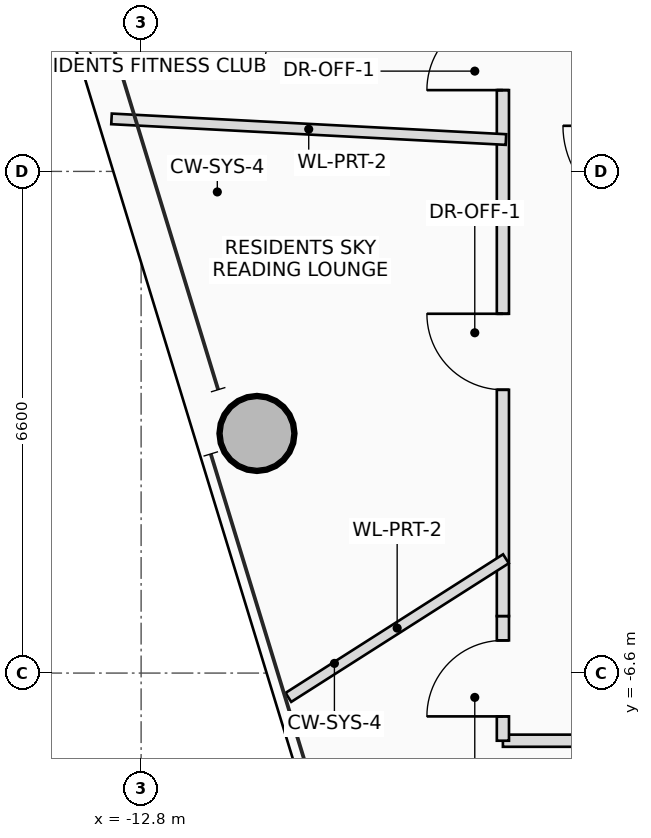
"""IFC4 building model, lengths in metres.
Left out: names, types, materials, properties, quantities, classifications, styles, units other than length and angle.
Written with IfcOpenShell. Run it as: python <this file> out.ifc"""

import sys

from ifc_helpers import new_model, si_unit, direction, frame, frame_2d, origin, origin_2d, place, context, subcontext, project, spatial, rectangle, hollow_circle, extrude, source, transform, mapped, element, fill, save


model = new_model("IFC4")
c1 = context("Model", 3, precision=1e-05, world=origin(), true_north=direction((0.0, 1.0)))
c2 = subcontext(c1, "Body", "Model", "MODEL_VIEW")
j1 = project(units=[si_unit("LENGTHUNIT", "METRE"), si_unit("PLANEANGLEUNIT", "RADIAN")], contexts=[c1])
p1 = place(None, origin())
s1 = spatial("IfcSite", under=j1, at=p1, CompositionType="ELEMENT")
p2 = place(p1, origin())
s2 = spatial("IfcBuilding", under=s1, at=p2, CompositionType="ELEMENT")
p3 = place(p2, frame((0.0, 0.0, 232.05)))
s3 = spatial("IfcBuildingStorey", under=s2, at=p3, CompositionType="ELEMENT", Elevation=232.05)
m1 = source(origin(), c2, "Body", "SweptSolid", [
    extrude(hollow_circle(Radius=0.5, WallThickness=0.04, at=origin_2d()), origin(), (0.0, 0.0, 1.0), 3.4),
])
p4 = place(p3, frame((-11.276, -3.448, 0.0), z_axis=(0.0, 0.0, 1.0), x_axis=(1.0, 0.0, 0.0)))
e1 = element("IfcColumn", 1, at=p4, inside=s3, PredefinedType="COLUMN", context=c2, shape_type="MappedRepresentation", body=[
    mapped(m1, transform((0.0, 0.0, 0.0), scale=1.0)),
])
p5 = place(p3, frame((-6.36, -7.49, 0.0), z_axis=(0.0, 0.0, 1.0), x_axis=(-1.0, 0.0, 0.0)))
e2 = element("IfcWall", 2, at=p5, inside=s3, PredefinedType="PARTITIONING", context=c2, shape_type="SweptSolid", body=[
    extrude(rectangle(XDim=1.68, YDim=0.16, at=frame_2d((0.84, 0.0))), origin(), (0.0, 0.0, 1.0), 2.605),
])
p6 = place(p3, frame((-8.04, -7.49, 0.0), z_axis=(0.0, 0.0, 1.0), x_axis=(0.0, 1.0, 0.0)))
e3 = element("IfcWall", 3, at=p6, inside=s3, PredefinedType="PARTITIONING", context=c2, shape_type="SweptSolid", body=[
    extrude(rectangle(XDim=1.64, YDim=0.16, at=frame_2d((0.82, 0.0))), origin(), (0.0, 0.0, 1.0), 2.805),
])
p7 = place(p6, frame((0.32, 0.0, 0.0)))
e4 = element("IfcOpeningElement", 4, at=p7, cuts=e3, PredefinedType="OPENING", context=c2, shape_type="SweptSolid", body=[
    extrude(rectangle(XDim=1.0, YDim=2.25, at=frame_2d((0.5, 1.125))), frame((0.0, 0.09, 0.0), z_axis=(0.0, -1.0, 0.0), x_axis=(1.0, 0.0, 0.0)), (0.0, 0.0, 1.0), 0.18),
])
p8 = place(p3, frame((-8.04, -5.85, 0.0), z_axis=(0.0, 0.0, 1.0), x_axis=(0.0, 1.0, 0.0)))
e5 = element("IfcWall", 5, at=p8, inside=s3, PredefinedType="PARTITIONING", context=c2, shape_type="SweptSolid", body=[
    extrude(rectangle(XDim=11.7, YDim=0.16, at=frame_2d((5.85, 0.0))), origin(), (0.0, 0.0, 1.0), 2.605),
])
p9 = place(p8, frame((2.977, 0.0, 0.0)))
e6 = element("IfcOpeningElement", 6, at=p9, cuts=e5, PredefinedType="OPENING", context=c2, shape_type="SweptSolid", body=[
    extrude(rectangle(XDim=1.0, YDim=2.25, at=frame_2d((0.5, 1.125))), frame((0.0, 0.09, 0.0), z_axis=(0.0, -1.0, 0.0), x_axis=(1.0, 0.0, 0.0)), (0.0, 0.0, 1.0), 0.18),
])
p10 = place(p8, frame((6.919, 0.0, 0.0)))
e7 = element("IfcOpeningElement", 7, at=p10, cuts=e5, PredefinedType="OPENING", context=c2, shape_type="SweptSolid", body=[
    extrude(rectangle(XDim=1.0, YDim=2.25, at=frame_2d((0.5, 1.125))), frame((0.0, 0.09, 0.0), z_axis=(0.0, -1.0, 0.0), x_axis=(1.0, 0.0, 0.0)), (0.0, 0.0, 1.0), 0.18),
])
p11 = place(p3, frame((-8.0, 0.419, 0.0), z_axis=(0.0, 0.0, 1.0), x_axis=(-0.998629485047, 0.052336904702, 0.0)))
e8 = element("IfcWall", 8, at=p11, inside=s3, PredefinedType="PARTITIONING", context=c2, shape_type="SweptSolid", body=[
    extrude(rectangle(XDim=5.197, YDim=0.14, at=frame_2d((2.598, 0.0))), origin(), (0.0, 0.0, 1.0), 2.765),
])
p12 = place(p3, frame((-8.0, -5.097, 0.0), z_axis=(0.0, 0.0, 1.0), x_axis=(-0.843391828446, -0.537299007733, 0.0)))
e9 = element("IfcWall", 9, at=p12, inside=s3, PredefinedType="PARTITIONING", context=c2, shape_type="SweptSolid", body=[
    extrude(rectangle(XDim=3.394, YDim=0.14, at=frame_2d((1.697, 0.0))), origin(), (0.0, 0.0, 1.0), 2.765),
])
p13 = place(p3, frame((-6.033, -7.45, 0.0), z_axis=(0.0, 0.0, 1.0), x_axis=(-0.629318234002, -0.777147708195, 0.0)))
e10 = element("IfcWall", 10, at=p13, inside=s3, PredefinedType="PARTITIONING", context=c2, shape_type="SweptSolid", body=[
    extrude(rectangle(XDim=5.384, YDim=0.14, at=frame_2d((2.692, 0.0))), origin(), (0.0, 0.0, 1.0), 2.605),
])
p14 = place(p7, origin())
e11 = element("IfcDoor", 11, at=p14, inside=s3, OperationType="SINGLE_SWING_LEFT", PredefinedType="DOOR", context=c2, shape_type="SweptSolid", body=[
    extrude(rectangle(XDim=1.0, YDim=2.25, at=frame_2d((0.5, 1.125))), frame((0.0, 0.025, 0.0), z_axis=(0.0, -1.0, 0.0), x_axis=(1.0, 0.0, 0.0)), (0.0, 0.0, 1.0), 0.05),
])
fill(e4, e11)
p15 = place(p9, origin())
e12 = element("IfcDoor", 12, at=p15, inside=s3, OperationType="SINGLE_SWING_RIGHT", PredefinedType="DOOR", context=c2, shape_type="SweptSolid", body=[
    extrude(rectangle(XDim=1.0, YDim=2.25, at=frame_2d((0.5, 1.125))), frame((0.0, 0.025, 0.0), z_axis=(0.0, -1.0, 0.0), x_axis=(1.0, 0.0, 0.0)), (0.0, 0.0, 1.0), 0.05),
])
fill(e6, e12)
p16 = place(p10, origin())
e13 = element("IfcDoor", 13, at=p16, inside=s3, OperationType="SINGLE_SWING_LEFT", PredefinedType="DOOR", context=c2, shape_type="SweptSolid", body=[
    extrude(rectangle(XDim=1.0, YDim=2.25, at=frame_2d((0.5, 1.125))), frame((0.0, 0.025, 0.0), z_axis=(0.0, -1.0, 0.0), x_axis=(1.0, 0.0, 0.0)), (0.0, 0.0, 1.0), 0.05),
])
fill(e7, e13)
save(model, sys.argv[1])
